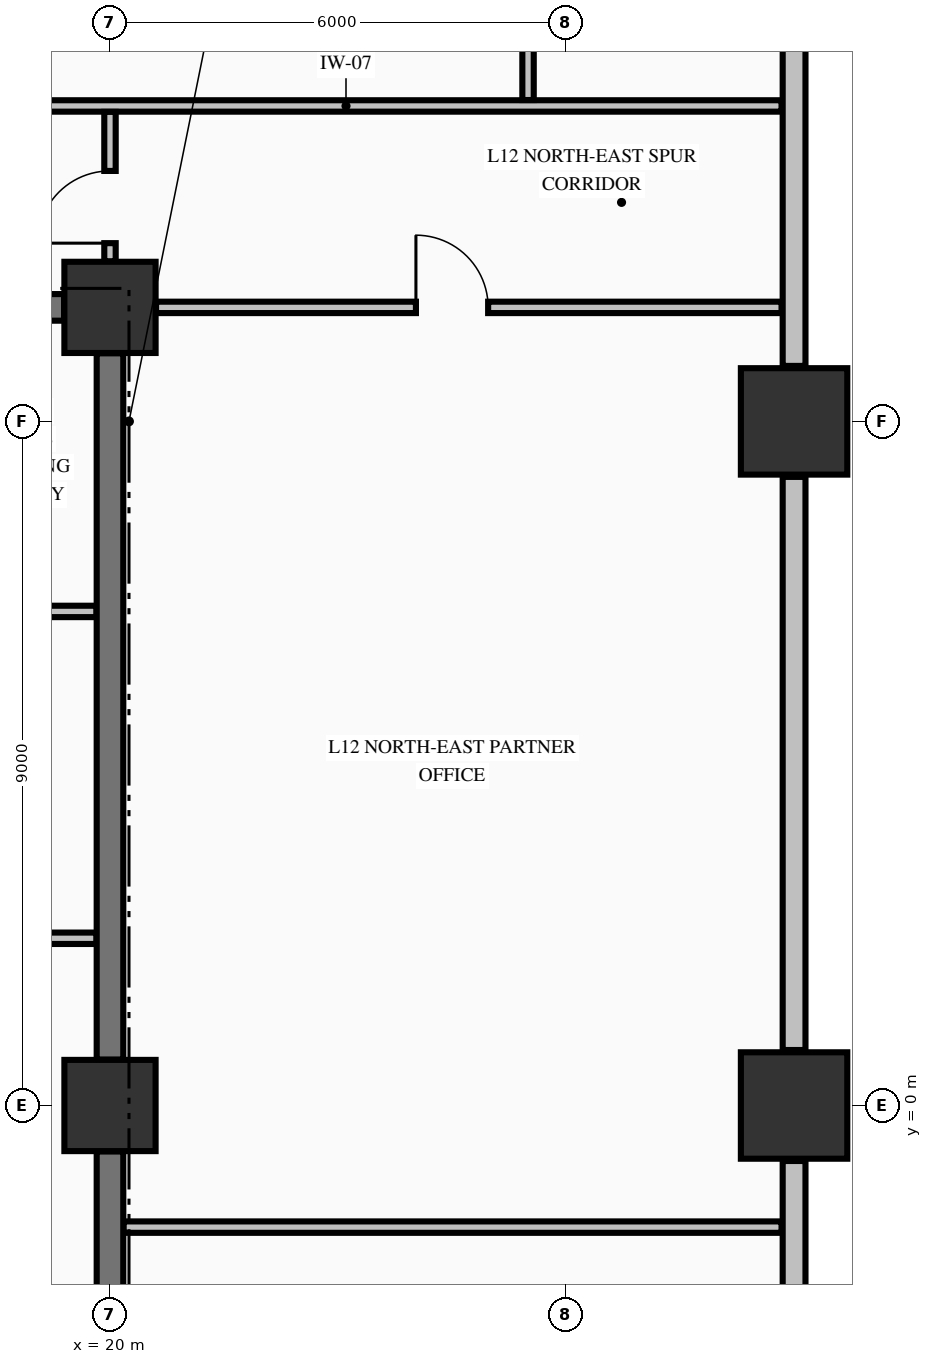
"""IFC4 building model, lengths in metres.
Left out: names, types, materials, properties, quantities, classifications, styles, units other than length and angle.
Written with IfcOpenShell. Run it as: python <this file> out.ifc"""

import sys

from ifc_helpers import new_model, si_unit, direction, frame, frame_2d, origin, origin_2d, place, context, subcontext, project, spatial, rectangle, extrude, element, fill, save


model = new_model("IFC4")
c1 = context("Model", 3, precision=1e-05, world=origin(), true_north=direction((0.0, 1.0)))
c2 = subcontext(c1, "Body", "Model", "MODEL_VIEW")
j1 = project(units=[si_unit("LENGTHUNIT", "METRE"), si_unit("PLANEANGLEUNIT", "RADIAN")], contexts=[c1])
p1 = place(None, origin())
s1 = spatial("IfcSite", under=j1, at=p1, CompositionType="ELEMENT")
p2 = place(p1, origin())
s2 = spatial("IfcBuilding", under=s1, at=p2, CompositionType="ELEMENT")
p3 = place(p2, frame((0.0, 0.0, 52.19)))
s3 = spatial("IfcBuildingStorey", under=s2, at=p3, CompositionType="ELEMENT", Elevation=52.19)
for number, where, z_axis, x_axis in (
    (1, (29.0, 0.0, -0.425), (0.0, 0.0, 1.0), (1.0, 0.0, 0.0)),
    (2, (29.0, 9.0, -0.425), (0.0, 0.0, 1.0), (1.0, 0.0, 0.0)),
):
    element("IfcColumn", number, at=place(p3, frame(where, z_axis=z_axis, x_axis=x_axis)), inside=s3, PredefinedType="COLUMN", context=c2, shape_type="SweptSolid", body=[
        extrude(rectangle(XDim=1.4, YDim=1.4, at=origin_2d()), origin(), (0.0, 0.0, 1.0), 5.0),
    ])
for number, where, z_axis, x_axis in (
    (3, (20.0, 10.5, -0.425), (0.0, 0.0, 1.0), (1.0, 0.0, 0.0)),
    (4, (20.0, 0.0, -0.425), (0.0, 0.0, 1.0), (1.0, 0.0, 0.0)),
):
    element("IfcColumn", number, at=place(p3, frame(where, z_axis=z_axis, x_axis=x_axis)), inside=s3, PredefinedType="COLUMN", context=c2, shape_type="SweptSolid", body=[
        extrude(rectangle(XDim=1.2, YDim=1.2, at=origin_2d()), origin(), (0.0, 0.0, 1.0), 5.0),
    ])
for number, where, z_axis, x_axis in (
    (5, (29.0, -8.27, 0.0), (0.0, 0.0, 1.0), (0.0, 1.0, 0.0)),
    (6, (29.0, 0.73, 0.0), (0.0, 0.0, 1.0), (0.0, 1.0, 0.0)),
):
    element("IfcWall", number, at=place(p3, frame(where, z_axis=z_axis, x_axis=x_axis)), inside=s3, PredefinedType="STANDARD", context=c2, shape_type="SweptSolid", body=[
        extrude(rectangle(XDim=7.54, YDim=0.3, at=frame_2d((3.77, 0.0))), origin(), (0.0, 0.0, 1.0), 2.167),
    ])
p4 = place(p3, frame((29.0, 9.73, 0.0), z_axis=(0.0, 0.0, 1.0), x_axis=(0.0, 1.0, 0.0)))
e7 = element("IfcWall", 7, at=p4, inside=s3, PredefinedType="STANDARD", context=c2, shape_type="SweptSolid", body=[
    extrude(rectangle(XDim=12.54, YDim=0.3, at=frame_2d((6.27, 0.0))), origin(), (0.0, 0.0, 1.0), 2.167),
])
p5 = place(p3, frame((14.7, 10.5, 0.0), z_axis=(0.0, 0.0, 1.0), x_axis=(1.0, 0.0, 0.0)))
e8 = element("IfcWall", 8, at=p5, inside=s3, PredefinedType="SHEAR", context=c2, shape_type="SweptSolid", body=[
    extrude(rectangle(XDim=4.696, YDim=0.35, at=frame_2d((2.348, 0.0))), origin(), (0.0, 0.0, 1.0), 4.575),
])
p6 = place(p5, frame((0.6, 0.0, 0.0)))
e9 = element("IfcOpeningElement", 9, at=p6, cuts=e8, PredefinedType="OPENING", context=c2, shape_type="SweptSolid", body=[
    extrude(rectangle(XDim=0.9, YDim=2.15, at=frame_2d((0.45, 1.075))), frame((0.0, 0.185, 0.0), z_axis=(0.0, -1.0, 0.0), x_axis=(1.0, 0.0, 0.0)), (0.0, 0.0, 1.0), 0.37),
])
p7 = place(p3, frame((20.178, -1.6, 0.0), z_axis=(0.0, 0.0, 1.0), x_axis=(1.0, 0.0, 0.0)))
e10 = element("IfcWall", 10, at=p7, inside=s3, PredefinedType="PARTITIONING", context=c2, shape_type="SweptSolid", body=[
    extrude(rectangle(XDim=8.657, YDim=0.15, at=frame_2d((4.329, 0.0))), origin(), (0.0, 0.0, 1.0), 4.575),
])
p8 = place(p3, frame((14.878, 2.2, 0.0), z_axis=(0.0, 0.0, 1.0), x_axis=(1.0, 0.0, 0.0)))
e11 = element("IfcWall", 11, at=p8, inside=s3, PredefinedType="PARTITIONING", context=c2, shape_type="SweptSolid", body=[
    extrude(rectangle(XDim=4.944, YDim=0.15, at=frame_2d((2.472, 0.0))), origin(), (0.0, 0.0, 1.0), 4.575),
])
p9 = place(p8, frame((0.397, 0.0, 0.0)))
e12 = element("IfcOpeningElement", 12, at=p9, cuts=e11, PredefinedType="OPENING", context=c2, shape_type="SweptSolid", body=[
    extrude(rectangle(XDim=0.95, YDim=2.15, at=frame_2d((0.475, 1.075))), frame((0.0, 0.085, 0.0), z_axis=(0.0, -1.0, 0.0), x_axis=(1.0, 0.0, 0.0)), (0.0, 0.0, 1.0), 0.17),
])
p10 = place(p3, frame((14.878, 6.5, 0.0), z_axis=(0.0, 0.0, 1.0), x_axis=(1.0, 0.0, 0.0)))
e13 = element("IfcWall", 13, at=p10, inside=s3, PredefinedType="PARTITIONING", context=c2, shape_type="SweptSolid", body=[
    extrude(rectangle(XDim=4.944, YDim=0.15, at=frame_2d((2.472, 0.0))), origin(), (0.0, 0.0, 1.0), 4.575),
])
p11 = place(p10, frame((0.397, 0.0, 0.0)))
e14 = element("IfcOpeningElement", 14, at=p11, cuts=e13, PredefinedType="OPENING", context=c2, shape_type="SweptSolid", body=[
    extrude(rectangle(XDim=0.95, YDim=2.15, at=frame_2d((0.475, 1.075))), frame((0.0, 0.085, 0.0), z_axis=(0.0, -1.0, 0.0), x_axis=(1.0, 0.0, 0.0)), (0.0, 0.0, 1.0), 0.17),
])
p12 = place(p10, frame((3.047, 0.0, 0.0)))
e15 = element("IfcOpeningElement", 15, at=p12, cuts=e13, PredefinedType="OPENING", context=c2, shape_type="SweptSolid", body=[
    extrude(rectangle(XDim=0.95, YDim=2.15, at=frame_2d((0.475, 1.075))), frame((0.0, 0.085, 0.0), z_axis=(0.0, -1.0, 0.0), x_axis=(1.0, 0.0, 0.0)), (0.0, 0.0, 1.0), 0.17),
])
p13 = place(p3, frame((20.606, 10.5, 0.0), z_axis=(0.0, 0.0, 1.0), x_axis=(1.0, 0.0, 0.0)))
e16 = element("IfcWall", 16, at=p13, inside=s3, PredefinedType="PARTITIONING", context=c2, shape_type="SweptSolid", body=[
    extrude(rectangle(XDim=8.229, YDim=0.15, at=frame_2d((4.115, 0.0))), origin(), (0.0, 0.0, 1.0), 4.575),
])
p14 = place(p13, frame((3.419, 0.0, 0.0)))
e17 = element("IfcOpeningElement", 17, at=p14, cuts=e16, PredefinedType="OPENING", context=c2, shape_type="SweptSolid", body=[
    extrude(rectangle(XDim=0.95, YDim=2.02, at=frame_2d((0.475, 1.01))), frame((0.0, 0.085, 0.0), z_axis=(0.0, -1.0, 0.0), x_axis=(1.0, 0.0, 0.0)), (0.0, 0.0, 1.0), 0.17),
])
p15 = place(p3, frame((-23.835, 13.15, 0.0), z_axis=(0.0, 0.0, 1.0), x_axis=(1.0, 0.0, 0.0)))
e18 = element("IfcWall", 18, at=p15, inside=s3, PredefinedType="PARTITIONING", context=c2, shape_type="SweptSolid", body=[
    extrude(rectangle(XDim=52.67, YDim=0.15, at=frame_2d((26.335, 0.0))), origin(), (0.0, 0.0, 1.0), 4.575),
])
p16 = place(p15, frame((8.56, 0.0, 0.0)))
e19 = element("IfcOpeningElement", 19, at=p16, cuts=e18, PredefinedType="OPENING", context=c2, shape_type="SweptSolid", body=[
    extrude(rectangle(XDim=1.05, YDim=2.15, at=frame_2d((0.525, 1.075))), frame((0.0, 0.085, 0.0), z_axis=(0.0, -1.0, 0.0), x_axis=(1.0, 0.0, 0.0)), (0.0, 0.0, 1.0), 0.17),
])
p17 = place(p15, frame((16.56, 0.0, 0.0)))
e20 = element("IfcOpeningElement", 20, at=p17, cuts=e18, PredefinedType="OPENING", context=c2, shape_type="SweptSolid", body=[
    extrude(rectangle(XDim=0.95, YDim=2.15, at=frame_2d((0.475, 1.075))), frame((0.0, 0.085, 0.0), z_axis=(0.0, -1.0, 0.0), x_axis=(1.0, 0.0, 0.0)), (0.0, 0.0, 1.0), 0.17),
])
p18 = place(p15, frame((23.81, 0.0, 0.0)))
e21 = element("IfcOpeningElement", 21, at=p18, cuts=e18, PredefinedType="OPENING", context=c2, shape_type="SweptSolid", body=[
    extrude(rectangle(XDim=0.95, YDim=2.02, at=frame_2d((0.475, 1.01))), frame((0.0, 0.085, 0.0), z_axis=(0.0, -1.0, 0.0), x_axis=(1.0, 0.0, 0.0)), (0.0, 0.0, 1.0), 0.17),
])
p19 = place(p15, frame((28.36, 0.0, 0.0)))
e22 = element("IfcOpeningElement", 22, at=p19, cuts=e18, PredefinedType="OPENING", context=c2, shape_type="SweptSolid", body=[
    extrude(rectangle(XDim=0.95, YDim=2.15, at=frame_2d((0.475, 1.075))), frame((0.0, 0.085, 0.0), z_axis=(0.0, -1.0, 0.0), x_axis=(1.0, 0.0, 0.0)), (0.0, 0.0, 1.0), 0.17),
])
p20 = place(p15, frame((35.61, 0.0, 0.0)))
e23 = element("IfcOpeningElement", 23, at=p20, cuts=e18, PredefinedType="OPENING", context=c2, shape_type="SweptSolid", body=[
    extrude(rectangle(XDim=0.95, YDim=2.15, at=frame_2d((0.475, 1.075))), frame((0.0, 0.085, 0.0), z_axis=(0.0, -1.0, 0.0), x_axis=(1.0, 0.0, 0.0)), (0.0, 0.0, 1.0), 0.17),
])
p21 = place(p15, frame((40.16, 0.0, 0.0)))
e24 = element("IfcOpeningElement", 24, at=p21, cuts=e18, PredefinedType="OPENING", context=c2, shape_type="SweptSolid", body=[
    extrude(rectangle(XDim=1.05, YDim=2.15, at=frame_2d((0.525, 1.075))), frame((0.0, 0.085, 0.0), z_axis=(0.0, -1.0, 0.0), x_axis=(1.0, 0.0, 0.0)), (0.0, 0.0, 1.0), 0.17),
])
p22 = place(p3, frame((20.0, -4.423, 0.0), z_axis=(0.0, 0.0, 1.0), x_axis=(0.0, 1.0, 0.0)))
e25 = element("IfcWall", 25, at=p22, inside=s3, PredefinedType="SHEAR", context=c2, shape_type="SweptSolid", body=[
    extrude(rectangle(XDim=3.819, YDim=0.35, at=frame_2d((1.91, 0.0))), origin(), (0.0, 0.0, 1.0), 4.575),
])
p23 = place(p3, frame((20.0, 0.604, 0.0), z_axis=(0.0, 0.0, 1.0), x_axis=(0.0, 1.0, 0.0)))
e26 = element("IfcWall", 26, at=p23, inside=s3, PredefinedType="SHEAR", context=c2, shape_type="SweptSolid", body=[
    extrude(rectangle(XDim=9.292, YDim=0.35, at=frame_2d((4.646, 0.0))), origin(), (0.0, 0.0, 1.0), 4.575),
])
p24 = place(p3, frame((20.0, 11.106, 0.0), z_axis=(0.0, 0.0, 1.0), x_axis=(0.0, 1.0, 0.0)))
e27 = element("IfcWall", 27, at=p24, inside=s3, PredefinedType="PARTITIONING", context=c2, shape_type="SweptSolid", body=[
    extrude(rectangle(XDim=1.966, YDim=0.15, at=frame_2d((0.983, 0.0))), origin(), (0.0, 0.0, 1.0), 4.575),
])
p25 = place(p24, frame((0.239, 0.0, 0.0)))
e28 = element("IfcOpeningElement", 28, at=p25, cuts=e27, PredefinedType="OPENING", context=c2, shape_type="SweptSolid", body=[
    extrude(rectangle(XDim=0.95, YDim=2.02, at=frame_2d((0.475, 1.01))), frame((0.0, 0.085, 0.0), z_axis=(0.0, -1.0, 0.0), x_axis=(1.0, 0.0, 0.0)), (0.0, 0.0, 1.0), 0.17),
])
p26 = place(p3, frame((25.5, 13.228, 0.0), z_axis=(0.0, 0.0, 1.0), x_axis=(0.0, 1.0, 0.0)))
e29 = element("IfcWall", 29, at=p26, inside=s3, PredefinedType="PARTITIONING", context=c2, shape_type="SweptSolid", body=[
    extrude(rectangle(XDim=9.066, YDim=0.15, at=frame_2d((4.533, 0.0))), origin(), (0.0, 0.0, 1.0), 4.575),
])
p27 = place(p25, origin())
e30 = element("IfcDoor", 30, at=p27, inside=s3, OperationType="SINGLE_SWING_LEFT", PredefinedType="DOOR", context=c2, shape_type="SweptSolid", body=[
    extrude(rectangle(XDim=0.95, YDim=2.02, at=frame_2d((0.475, 1.01))), frame((0.0, 0.025, 0.0), z_axis=(0.0, -1.0, 0.0), x_axis=(1.0, 0.0, 0.0)), (0.0, 0.0, 1.0), 0.05),
])
fill(e28, e30)
p28 = place(p14, origin())
e31 = element("IfcDoor", 31, at=p28, inside=s3, OperationType="SINGLE_SWING_LEFT", PredefinedType="DOOR", context=c2, shape_type="SweptSolid", body=[
    extrude(rectangle(XDim=0.95, YDim=2.02, at=frame_2d((0.475, 1.01))), frame((0.0, 0.025, 0.0), z_axis=(0.0, -1.0, 0.0), x_axis=(1.0, 0.0, 0.0)), (0.0, 0.0, 1.0), 0.05),
])
fill(e17, e31)
save(model, sys.argv[1])
